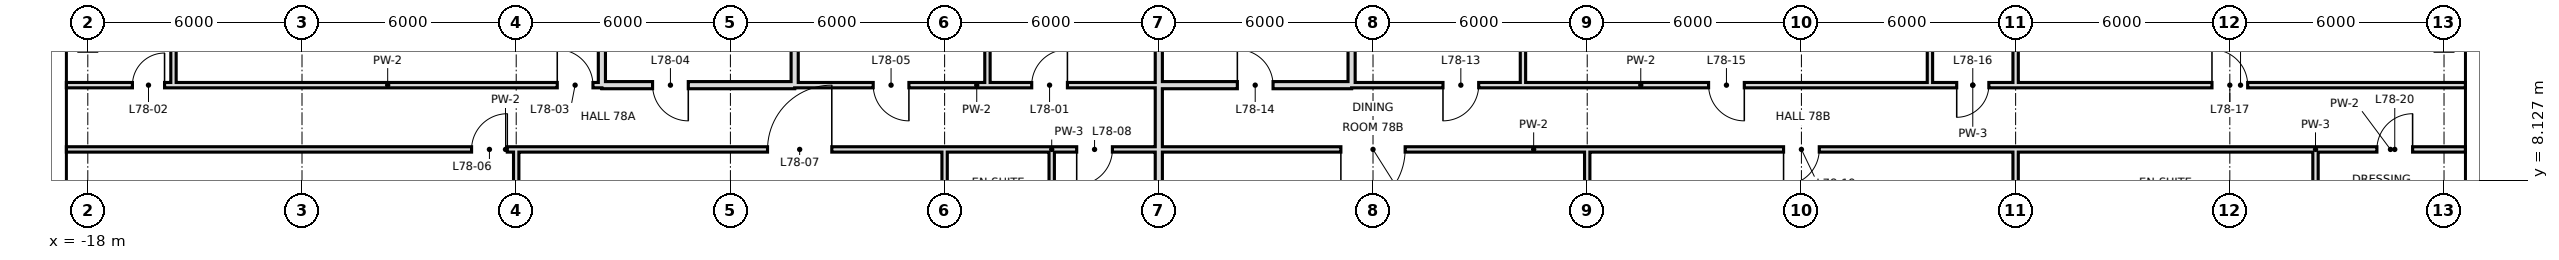
"""IFC4 building model, lengths in metres.
Left out: names, types, materials, properties, quantities, classifications, styles, units other than length and angle.
Written with IfcOpenShell. Run it as: python <this file> out.ifc"""

import sys

from ifc_helpers import new_model, si_unit, direction, frame, frame_2d, origin, place, context, subcontext, project, spatial, rectangle, extrude, element, fill, save


model = new_model("IFC4")
c1 = context("Model", 3, precision=1e-05, world=origin(), true_north=direction((0.0, 1.0)))
c2 = subcontext(c1, "Body", "Model", "MODEL_VIEW")
j1 = project(units=[si_unit("LENGTHUNIT", "METRE"), si_unit("PLANEANGLEUNIT", "RADIAN")], contexts=[c1])
p1 = place(None, origin())
s1 = spatial("IfcSite", under=j1, at=p1, CompositionType="ELEMENT")
p2 = place(p1, origin())
s2 = spatial("IfcBuilding", under=s1, at=p2, CompositionType="ELEMENT")
p3 = place(p2, frame((0.0, 0.0, 326.8)))
s3 = spatial("IfcBuildingStorey", under=s2, at=p3, CompositionType="ELEMENT", Elevation=326.8)
p4 = place(p3, frame((-15.6, 10.8, 0.0), z_axis=(0.0, 0.0, 1.0), x_axis=(0.0, 1.0, 0.0)))
e1 = element("IfcWall", 1, at=p4, inside=s3, PredefinedType="PARTITIONING", context=c2, shape_type="SweptSolid", body=[
    extrude(rectangle(XDim=7.2, YDim=0.15, at=frame_2d((3.6, 0.0))), origin(), (0.0, 0.0, 1.0), 4.1),
])
p5 = place(p3, frame((-3.6, 10.8, 0.0), z_axis=(0.0, 0.0, 1.0), x_axis=(0.0, 1.0, 0.0)))
e2 = element("IfcWall", 2, at=p5, inside=s3, PredefinedType="SOLIDWALL", context=c2, shape_type="SweptSolid", body=[
    extrude(rectangle(XDim=7.2, YDim=0.2, at=frame_2d((3.6, 0.0))), origin(), (0.0, 0.0, 1.0), 3.4),
])
p6 = place(p3, frame((-6.0, -0.6, 0.0), z_axis=(0.0, 0.0, 1.0), x_axis=(0.0, 1.0, 0.0)))
e3 = element("IfcWall", 3, at=p6, inside=s3, PredefinedType="PARTITIONING", context=c2, shape_type="SweptSolid", body=[
    extrude(rectangle(XDim=9.6, YDim=0.15, at=frame_2d((4.8, 0.0))), origin(), (0.0, 0.0, 1.0), 4.1),
])
p7 = place(p3, frame((1.8, 10.8, 0.0), z_axis=(0.0, 0.0, 1.0), x_axis=(0.0, 1.0, 0.0)))
e4 = element("IfcWall", 4, at=p7, inside=s3, PredefinedType="SOLIDWALL", context=c2, shape_type="SweptSolid", body=[
    extrude(rectangle(XDim=7.2, YDim=0.2, at=frame_2d((3.6, 0.0))), origin(), (0.0, 0.0, 1.0), 4.1),
])
p8 = place(p3, frame((12.0, 10.8, 0.0), z_axis=(0.0, 0.0, 1.0), x_axis=(0.0, 1.0, 0.0)))
e5 = element("IfcWall", 5, at=p8, inside=s3, PredefinedType="SOLIDWALL", context=c2, shape_type="SweptSolid", body=[
    extrude(rectangle(XDim=7.9, YDim=0.2, at=frame_2d((3.95, 0.0))), origin(), (0.0, 0.0, 1.0), 3.4),
])
p9 = place(p3, frame((12.0, 0.0, 0.0), z_axis=(0.0, 0.0, 1.0), x_axis=(0.0, 1.0, 0.0)))
e6 = element("IfcWall", 6, at=p9, inside=s3, PredefinedType="SOLIDWALL", context=c2, shape_type="SweptSolid", body=[
    extrude(rectangle(XDim=10.8, YDim=0.2, at=frame_2d((5.4, 0.0))), origin(), (0.0, 0.0, 1.0), 3.4),
])
p10 = place(p3, frame((17.4, 10.8, 0.0), z_axis=(0.0, 0.0, 1.0), x_axis=(0.0, 1.0, 0.0)))
e7 = element("IfcWall", 7, at=p10, inside=s3, PredefinedType="SOLIDWALL", context=c2, shape_type="SweptSolid", body=[
    extrude(rectangle(XDim=7.9, YDim=0.2, at=frame_2d((3.95, 0.0))), origin(), (0.0, 0.0, 1.0), 3.4),
])
p11 = place(p3, frame((22.2, 10.8, 0.0), z_axis=(0.0, 0.0, 1.0), x_axis=(0.0, 1.0, 0.0)))
e8 = element("IfcWall", 8, at=p11, inside=s3, PredefinedType="PARTITIONING", context=c2, shape_type="SweptSolid", body=[
    extrude(rectangle(XDim=7.9, YDim=0.15, at=frame_2d((3.95, 0.0))), origin(), (0.0, 0.0, 1.0), 4.1),
])
p12 = place(p3, frame((24.0, 0.0, 0.0), z_axis=(0.0, 0.0, 1.0), x_axis=(0.0, 1.0, 0.0)))
e9 = element("IfcWall", 9, at=p12, inside=s3, PredefinedType="PARTITIONING", context=c2, shape_type="SweptSolid", body=[
    extrude(rectangle(XDim=9.0, YDim=0.15, at=frame_2d((4.5, 0.0))), origin(), (0.0, 0.0, 1.0), 3.4),
])
p13 = place(p3, frame((33.6, 10.8, 0.0), z_axis=(0.0, 0.0, 1.0), x_axis=(0.0, 1.0, 0.0)))
e10 = element("IfcWall", 10, at=p13, inside=s3, PredefinedType="PARTITIONING", context=c2, shape_type="SweptSolid", body=[
    extrude(rectangle(XDim=7.9, YDim=0.15, at=frame_2d((3.95, 0.0))), origin(), (0.0, 0.0, 1.0), 4.1),
])
p14 = place(p3, frame((36.0, 6.0, 0.0), z_axis=(0.0, 0.0, 1.0), x_axis=(0.0, 1.0, 0.0)))
e11 = element("IfcWall", 11, at=p14, inside=s3, PredefinedType="PARTITIONING", context=c2, shape_type="SweptSolid", body=[
    extrude(rectangle(XDim=3.0, YDim=0.15, at=frame_2d((1.5, 0.0))), origin(), (0.0, 0.0, 1.0), 3.4),
])
p15 = place(p3, frame((36.0, 10.8, 0.0), z_axis=(0.0, 0.0, 1.0), x_axis=(0.0, 1.0, 0.0)))
e12 = element("IfcWall", 12, at=p15, inside=s3, PredefinedType="PARTITIONING", context=c2, shape_type="SweptSolid", body=[
    extrude(rectangle(XDim=7.9, YDim=0.15, at=frame_2d((3.95, 0.0))), origin(), (0.0, 0.0, 1.0), 3.4),
])
p16 = place(p3, frame((44.4, 6.0, 0.0), z_axis=(0.0, 0.0, 1.0), x_axis=(0.0, 1.0, 0.0)))
e13 = element("IfcWall", 13, at=p16, inside=s3, PredefinedType="PARTITIONING", context=c2, shape_type="SweptSolid", body=[
    extrude(rectangle(XDim=3.0, YDim=0.15, at=frame_2d((1.5, 0.0))), origin(), (0.0, 0.0, 1.0), 4.1),
])
p17 = place(p3, frame((6.0, 6.0, 0.0), z_axis=(0.0, 0.0, 1.0), x_axis=(0.0, 1.0, 0.0)))
e14 = element("IfcWall", 14, at=p17, inside=s3, PredefinedType="PARTITIONING", context=c2, shape_type="SweptSolid", body=[
    extrude(rectangle(XDim=3.0, YDim=0.15, at=frame_2d((1.5, 0.0))), origin(), (0.0, 0.0, 1.0), 3.4),
])
p18 = place(p3, frame((7.2, 10.8, 0.0), z_axis=(0.0, 0.0, 1.0), x_axis=(0.0, 1.0, 0.0)))
e15 = element("IfcWall", 15, at=p18, inside=s3, PredefinedType="PARTITIONING", context=c2, shape_type="SweptSolid", body=[
    extrude(rectangle(XDim=7.9, YDim=0.15, at=frame_2d((3.95, 0.0))), origin(), (0.0, 0.0, 1.0), 4.1),
])
p19 = place(p3, frame((9.0, 6.0, 0.0), z_axis=(0.0, 0.0, 1.0), x_axis=(0.0, 1.0, 0.0)))
e16 = element("IfcWall", 16, at=p19, inside=s3, PredefinedType="PARTITIONING", context=c2, shape_type="SweptSolid", body=[
    extrude(rectangle(XDim=3.0, YDim=0.15, at=frame_2d((1.5, 0.0))), origin(), (0.0, 0.0, 1.0), 4.1),
])
p20 = place(p3, frame((-3.6, 10.8, 0.0), z_axis=(0.0, 0.0, 1.0), x_axis=(1.0, 0.0, 0.0)))
e17 = element("IfcWall", 17, at=p20, inside=s3, PredefinedType="SOLIDWALL", context=c2, shape_type="SweptSolid", body=[
    extrude(rectangle(XDim=5.4, YDim=0.2, at=frame_2d((2.7, 0.0))), origin(), (0.0, 0.0, 1.0), 3.4),
])
p21 = place(p20, frame((1.42, 0.0, 0.0)))
e18 = element("IfcOpeningElement", 18, at=p21, cuts=e17, PredefinedType="OPENING", context=c2, shape_type="SweptSolid", body=[
    extrude(rectangle(XDim=1.0, YDim=2.4, at=frame_2d((0.5, 1.2))), frame((0.0, 0.11, 0.0), z_axis=(0.0, -1.0, 0.0), x_axis=(1.0, 0.0, 0.0)), (0.0, 0.0, 1.0), 0.22),
])
p22 = place(p3, frame((12.0, 10.8, 0.0), z_axis=(0.0, 0.0, 1.0), x_axis=(1.0, 0.0, 0.0)))
e19 = element("IfcWall", 19, at=p22, inside=s3, PredefinedType="SOLIDWALL", context=c2, shape_type="SweptSolid", body=[
    extrude(rectangle(XDim=5.4, YDim=0.2, at=frame_2d((2.7, 0.0))), origin(), (0.0, 0.0, 1.0), 3.4),
])
p23 = place(p22, frame((2.2, 0.0, 0.0)))
e20 = element("IfcOpeningElement", 20, at=p23, cuts=e19, PredefinedType="OPENING", context=c2, shape_type="SweptSolid", body=[
    extrude(rectangle(XDim=1.0, YDim=2.4, at=frame_2d((0.5, 1.2))), frame((0.0, 0.11, 0.0), z_axis=(0.0, -1.0, 0.0), x_axis=(1.0, 0.0, 0.0)), (0.0, 0.0, 1.0), 0.22),
])
p24 = place(p3, frame((-15.6, 10.8, 0.0), z_axis=(0.0, 0.0, 1.0), x_axis=(1.0, 0.0, 0.0)))
e21 = element("IfcWall", 21, at=p24, inside=s3, PredefinedType="PARTITIONING", context=c2, shape_type="SweptSolid", body=[
    extrude(rectangle(XDim=12.0, YDim=0.15, at=frame_2d((6.0, 0.0))), origin(), (0.0, 0.0, 1.0), 4.1),
])
p25 = place(p24, frame((10.75, 0.0, 0.0)))
e22 = element("IfcOpeningElement", 22, at=p25, cuts=e21, PredefinedType="OPENING", context=c2, shape_type="SweptSolid", body=[
    extrude(rectangle(XDim=1.0, YDim=2.4, at=frame_2d((0.5, 1.2))), frame((0.0, 0.085, 0.0), z_axis=(0.0, -1.0, 0.0), x_axis=(1.0, 0.0, 0.0)), (0.0, 0.0, 1.0), 0.17),
])
p26 = place(p3, frame((1.8, 10.8, 0.0), z_axis=(0.0, 0.0, 1.0), x_axis=(1.0, 0.0, 0.0)))
e23 = element("IfcWall", 23, at=p26, inside=s3, PredefinedType="PARTITIONING", context=c2, shape_type="SweptSolid", body=[
    extrude(rectangle(XDim=10.2, YDim=0.15, at=frame_2d((5.1, 0.0))), origin(), (0.0, 0.0, 1.0), 4.1),
])
p27 = place(p26, frame((6.64, 0.0, 0.0)))
e24 = element("IfcOpeningElement", 24, at=p27, cuts=e23, PredefinedType="OPENING", context=c2, shape_type="SweptSolid", body=[
    extrude(rectangle(XDim=1.0, YDim=2.4, at=frame_2d((0.5, 1.2))), frame((0.0, 0.085, 0.0), z_axis=(0.0, -1.0, 0.0), x_axis=(1.0, 0.0, 0.0)), (0.0, 0.0, 1.0), 0.17),
])
p28 = place(p26, frame((2.2, 0.0, 0.0)))
e25 = element("IfcOpeningElement", 25, at=p28, cuts=e23, PredefinedType="OPENING", context=c2, shape_type="SweptSolid", body=[
    extrude(rectangle(XDim=1.0, YDim=2.4, at=frame_2d((0.5, 1.2))), frame((0.0, 0.085, 0.0), z_axis=(0.0, -1.0, 0.0), x_axis=(1.0, 0.0, 0.0)), (0.0, 0.0, 1.0), 0.17),
])
p29 = place(p3, frame((17.4, 10.8, 0.0), z_axis=(0.0, 0.0, 1.0), x_axis=(1.0, 0.0, 0.0)))
e26 = element("IfcWall", 26, at=p29, inside=s3, PredefinedType="PARTITIONING", context=c2, shape_type="SweptSolid", body=[
    extrude(rectangle(XDim=16.2, YDim=0.15, at=frame_2d((8.1, 0.0))), origin(), (0.0, 0.0, 1.0), 4.1),
])
p30 = place(p29, frame((2.56, 0.0, 0.0)))
e27 = element("IfcOpeningElement", 27, at=p30, cuts=e26, PredefinedType="OPENING", context=c2, shape_type="SweptSolid", body=[
    extrude(rectangle(XDim=1.0, YDim=2.4, at=frame_2d((0.5, 1.2))), frame((0.0, 0.085, 0.0), z_axis=(0.0, -1.0, 0.0), x_axis=(1.0, 0.0, 0.0)), (0.0, 0.0, 1.0), 0.17),
])
p31 = place(p29, frame((10.0, 0.0, 0.0)))
e28 = element("IfcOpeningElement", 28, at=p31, cuts=e26, PredefinedType="OPENING", context=c2, shape_type="SweptSolid", body=[
    extrude(rectangle(XDim=1.0, YDim=2.4, at=frame_2d((0.5, 1.2))), frame((0.0, 0.085, 0.0), z_axis=(0.0, -1.0, 0.0), x_axis=(1.0, 0.0, 0.0)), (0.0, 0.0, 1.0), 0.17),
])
p32 = place(p3, frame((36.0, 10.8, 0.0), z_axis=(0.0, 0.0, 1.0), x_axis=(1.0, 0.0, 0.0)))
e29 = element("IfcWall", 29, at=p32, inside=s3, PredefinedType="PARTITIONING", context=c2, shape_type="SweptSolid", body=[
    extrude(rectangle(XDim=12.6, YDim=0.15, at=frame_2d((6.3, 0.0))), origin(), (0.0, 0.0, 1.0), 4.1),
])
p33 = place(p32, frame((5.5, 0.0, 0.0)))
e30 = element("IfcOpeningElement", 30, at=p33, cuts=e29, PredefinedType="OPENING", context=c2, shape_type="SweptSolid", body=[
    extrude(rectangle(XDim=1.0, YDim=2.4, at=frame_2d((0.5, 1.2))), frame((0.0, 0.085, 0.0), z_axis=(0.0, -1.0, 0.0), x_axis=(1.0, 0.0, 0.0)), (0.0, 0.0, 1.0), 0.17),
])
p34 = place(p3, frame((-18.6, 10.8, 0.0), z_axis=(0.0, 0.0, 1.0), x_axis=(1.0, 0.0, 0.0)))
e31 = element("IfcWall", 31, at=p34, inside=s3, PredefinedType="PARTITIONING", context=c2, shape_type="SweptSolid", body=[
    extrude(rectangle(XDim=3.0, YDim=0.15, at=frame_2d((1.5, 0.0))), origin(), (0.0, 0.0, 1.0), 4.1),
])
p35 = place(p34, frame((1.85, 0.0, 0.0)))
e32 = element("IfcOpeningElement", 32, at=p35, cuts=e31, PredefinedType="OPENING", context=c2, shape_type="SweptSolid", body=[
    extrude(rectangle(XDim=0.9, YDim=2.4, at=frame_2d((0.45, 1.2))), frame((0.0, 0.085, 0.0), z_axis=(0.0, -1.0, 0.0), x_axis=(1.0, 0.0, 0.0)), (0.0, 0.0, 1.0), 0.17),
])
p36 = place(p3, frame((33.6, 10.8, 0.0), z_axis=(0.0, 0.0, 1.0), x_axis=(1.0, 0.0, 0.0)))
e33 = element("IfcWall", 33, at=p36, inside=s3, PredefinedType="PARTITIONING", context=c2, shape_type="SweptSolid", body=[
    extrude(rectangle(XDim=2.4, YDim=0.15, at=frame_2d((1.2, 0.0))), origin(), (0.0, 0.0, 1.0), 4.1),
])
p37 = place(p36, frame((0.75, 0.0, 0.0)))
e34 = element("IfcOpeningElement", 34, at=p37, cuts=e33, PredefinedType="OPENING", context=c2, shape_type="SweptSolid", body=[
    extrude(rectangle(XDim=0.9, YDim=2.4, at=frame_2d((0.45, 1.2))), frame((0.0, 0.085, 0.0), z_axis=(0.0, -1.0, 0.0), x_axis=(1.0, 0.0, 0.0)), (0.0, 0.0, 1.0), 0.17),
])
p38 = place(p3, frame((-18.6, 9.0, 0.0), z_axis=(0.0, 0.0, 1.0), x_axis=(1.0, 0.0, 0.0)))
e35 = element("IfcWall", 35, at=p38, inside=s3, PredefinedType="PARTITIONING", context=c2, shape_type="SweptSolid", body=[
    extrude(rectangle(XDim=24.6, YDim=0.15, at=frame_2d((12.3, 0.0))), origin(), (0.0, 0.0, 1.0), 4.1),
])
p39 = place(p38, frame((11.35, 0.0, 0.0)))
e36 = element("IfcOpeningElement", 36, at=p39, cuts=e35, PredefinedType="OPENING", context=c2, shape_type="SweptSolid", body=[
    extrude(rectangle(XDim=1.0, YDim=2.4, at=frame_2d((0.5, 1.2))), frame((0.0, 0.085, 0.0), z_axis=(0.0, -1.0, 0.0), x_axis=(1.0, 0.0, 0.0)), (0.0, 0.0, 1.0), 0.17),
])
p40 = place(p38, frame((19.64, 0.0, 0.0)))
e37 = element("IfcOpeningElement", 37, at=p40, cuts=e35, PredefinedType="OPENING", context=c2, shape_type="SweptSolid", body=[
    extrude(rectangle(XDim=1.8, YDim=2.4, at=frame_2d((0.9, 1.2))), frame((0.0, 0.085, 0.0), z_axis=(0.0, -1.0, 0.0), x_axis=(1.0, 0.0, 0.0)), (0.0, 0.0, 1.0), 0.17),
])
p41 = place(p3, frame((9.0, 9.0, 0.0), z_axis=(0.0, 0.0, 1.0), x_axis=(1.0, 0.0, 0.0)))
e38 = element("IfcWall", 38, at=p41, inside=s3, PredefinedType="PARTITIONING", context=c2, shape_type="SweptSolid", body=[
    extrude(rectangle(XDim=27.0, YDim=0.15, at=frame_2d((13.5, 0.0))), origin(), (0.0, 0.0, 1.0), 4.1),
])
p42 = place(p41, frame((0.7, 0.0, 0.0)))
e39 = element("IfcOpeningElement", 39, at=p42, cuts=e38, PredefinedType="OPENING", context=c2, shape_type="SweptSolid", body=[
    extrude(rectangle(XDim=1.0, YDim=2.4, at=frame_2d((0.5, 1.2))), frame((0.0, 0.085, 0.0), z_axis=(0.0, -1.0, 0.0), x_axis=(1.0, 0.0, 0.0)), (0.0, 0.0, 1.0), 0.17),
])
p43 = place(p41, frame((8.1, 0.0, 0.0)))
e40 = element("IfcOpeningElement", 40, at=p43, cuts=e38, PredefinedType="OPENING", context=c2, shape_type="SweptSolid", body=[
    extrude(rectangle(XDim=1.8, YDim=2.4, at=frame_2d((0.9, 1.2))), frame((0.0, 0.085, 0.0), z_axis=(0.0, -1.0, 0.0), x_axis=(1.0, 0.0, 0.0)), (0.0, 0.0, 1.0), 0.17),
])
p44 = place(p41, frame((20.5, 0.0, 0.0)))
e41 = element("IfcOpeningElement", 41, at=p44, cuts=e38, PredefinedType="OPENING", context=c2, shape_type="SweptSolid", body=[
    extrude(rectangle(XDim=1.0, YDim=2.4, at=frame_2d((0.5, 1.2))), frame((0.0, 0.085, 0.0), z_axis=(0.0, -1.0, 0.0), x_axis=(1.0, 0.0, 0.0)), (0.0, 0.0, 1.0), 0.17),
])
p45 = place(p3, frame((44.4, 9.0, 0.0), z_axis=(0.0, 0.0, 1.0), x_axis=(1.0, 0.0, 0.0)))
e42 = element("IfcWall", 42, at=p45, inside=s3, PredefinedType="PARTITIONING", context=c2, shape_type="SweptSolid", body=[
    extrude(rectangle(XDim=4.2, YDim=0.15, at=frame_2d((2.1, 0.0))), origin(), (0.0, 0.0, 1.0), 4.1),
])
p46 = place(p45, frame((1.72, 0.0, 0.0)))
e43 = element("IfcOpeningElement", 43, at=p46, cuts=e42, PredefinedType="OPENING", context=c2, shape_type="SweptSolid", body=[
    extrude(rectangle(XDim=1.0, YDim=2.4, at=frame_2d((0.5, 1.2))), frame((0.0, 0.085, 0.0), z_axis=(0.0, -1.0, 0.0), x_axis=(1.0, 0.0, 0.0)), (0.0, 0.0, 1.0), 0.17),
])
p47 = place(p3, frame((6.0, 9.0, 0.0), z_axis=(0.0, 0.0, 1.0), x_axis=(1.0, 0.0, 0.0)))
e44 = element("IfcWall", 44, at=p47, inside=s3, PredefinedType="PARTITIONING", context=c2, shape_type="SweptSolid", body=[
    extrude(rectangle(XDim=3.0, YDim=0.15, at=frame_2d((1.5, 0.0))), origin(), (0.0, 0.0, 1.0), 4.1),
])
p48 = place(p3, frame((36.0, 9.0, 0.0), z_axis=(0.0, 0.0, 1.0), x_axis=(1.0, 0.0, 0.0)))
e45 = element("IfcWall", 45, at=p48, inside=s3, PredefinedType="PARTITIONING", context=c2, shape_type="SweptSolid", body=[
    extrude(rectangle(XDim=8.4, YDim=0.15, at=frame_2d((4.2, 0.0))), origin(), (0.0, 0.0, 1.0), 4.1),
])
p49 = place(p27, frame((1.0, 0.0, 0.0), z_axis=(0.0, 0.0, 1.0), x_axis=(-1.0, 0.0, 0.0)))
e46 = element("IfcDoor", 46, at=p49, inside=s3, OperationType="SINGLE_SWING_LEFT", PredefinedType="DOOR", context=c2, shape_type="SweptSolid", body=[
    extrude(rectangle(XDim=1.0, YDim=2.4, at=frame_2d((0.5, 1.2))), frame((0.0, 0.025, 0.0), z_axis=(0.0, -1.0, 0.0), x_axis=(1.0, 0.0, 0.0)), (0.0, 0.0, 1.0), 0.05),
])
fill(e24, e46)
p50 = place(p35, frame((0.9, 0.0, 0.0), z_axis=(0.0, 0.0, 1.0), x_axis=(-1.0, 0.0, 0.0)))
e47 = element("IfcDoor", 47, at=p50, inside=s3, OperationType="SINGLE_SWING_LEFT", PredefinedType="DOOR", context=c2, shape_type="SweptSolid", body=[
    extrude(rectangle(XDim=0.9, YDim=2.4, at=frame_2d((0.45, 1.2))), frame((0.0, 0.025, 0.0), z_axis=(0.0, -1.0, 0.0), x_axis=(1.0, 0.0, 0.0)), (0.0, 0.0, 1.0), 0.05),
])
fill(e32, e47)
p51 = place(p25, origin())
e48 = element("IfcDoor", 48, at=p51, inside=s3, OperationType="SINGLE_SWING_LEFT", PredefinedType="DOOR", context=c2, shape_type="SweptSolid", body=[
    extrude(rectangle(XDim=1.0, YDim=2.4, at=frame_2d((0.5, 1.2))), frame((0.0, 0.025, 0.0), z_axis=(0.0, -1.0, 0.0), x_axis=(1.0, 0.0, 0.0)), (0.0, 0.0, 1.0), 0.05),
])
fill(e22, e48)
p52 = place(p21, origin())
e49 = element("IfcDoor", 49, at=p52, inside=s3, OperationType="SINGLE_SWING_RIGHT", PredefinedType="DOOR", context=c2, shape_type="SweptSolid", body=[
    extrude(rectangle(XDim=1.0, YDim=2.4, at=frame_2d((0.5, 1.2))), frame((0.0, 0.025, 0.0), z_axis=(0.0, -1.0, 0.0), x_axis=(1.0, 0.0, 0.0)), (0.0, 0.0, 1.0), 0.05),
])
fill(e18, e49)
p53 = place(p28, origin())
e50 = element("IfcDoor", 50, at=p53, inside=s3, OperationType="SINGLE_SWING_RIGHT", PredefinedType="DOOR", context=c2, shape_type="SweptSolid", body=[
    extrude(rectangle(XDim=1.0, YDim=2.4, at=frame_2d((0.5, 1.2))), frame((0.0, 0.025, 0.0), z_axis=(0.0, -1.0, 0.0), x_axis=(1.0, 0.0, 0.0)), (0.0, 0.0, 1.0), 0.05),
])
fill(e25, e50)
p54 = place(p39, frame((1.0, 0.0, 0.0), z_axis=(0.0, 0.0, 1.0), x_axis=(-1.0, 0.0, 0.0)))
e51 = element("IfcDoor", 51, at=p54, inside=s3, OperationType="SINGLE_SWING_LEFT", PredefinedType="DOOR", context=c2, shape_type="SweptSolid", body=[
    extrude(rectangle(XDim=1.0, YDim=2.4, at=frame_2d((0.5, 1.2))), frame((0.0, 0.025, 0.0), z_axis=(0.0, -1.0, 0.0), x_axis=(1.0, 0.0, 0.0)), (0.0, 0.0, 1.0), 0.05),
])
fill(e36, e51)
p55 = place(p40, frame((1.8, 0.0, 0.0), z_axis=(0.0, 0.0, 1.0), x_axis=(-1.0, 0.0, 0.0)))
e52 = element("IfcDoor", 52, at=p55, inside=s3, OperationType="SINGLE_SWING_LEFT", PredefinedType="DOOR", context=c2, shape_type="SweptSolid", body=[
    extrude(rectangle(XDim=1.8, YDim=2.4, at=frame_2d((0.9, 1.2))), frame((0.0, 0.025, 0.0), z_axis=(0.0, -1.0, 0.0), x_axis=(1.0, 0.0, 0.0)), (0.0, 0.0, 1.0), 0.05),
])
fill(e37, e52)
p56 = place(p42, frame((1.0, 0.0, 0.0), z_axis=(0.0, 0.0, 1.0), x_axis=(-1.0, 0.0, 0.0)))
e53 = element("IfcDoor", 53, at=p56, inside=s3, OperationType="SINGLE_SWING_RIGHT", PredefinedType="DOOR", context=c2, shape_type="SweptSolid", body=[
    extrude(rectangle(XDim=1.0, YDim=2.4, at=frame_2d((0.5, 1.2))), frame((0.0, 0.025, 0.0), z_axis=(0.0, -1.0, 0.0), x_axis=(1.0, 0.0, 0.0)), (0.0, 0.0, 1.0), 0.05),
])
fill(e39, e53)
p57 = place(p30, frame((1.0, 0.0, 0.0), z_axis=(0.0, 0.0, 1.0), x_axis=(-1.0, 0.0, 0.0)))
e54 = element("IfcDoor", 54, at=p57, inside=s3, OperationType="SINGLE_SWING_RIGHT", PredefinedType="DOOR", context=c2, shape_type="SweptSolid", body=[
    extrude(rectangle(XDim=1.0, YDim=2.4, at=frame_2d((0.5, 1.2))), frame((0.0, 0.025, 0.0), z_axis=(0.0, -1.0, 0.0), x_axis=(1.0, 0.0, 0.0)), (0.0, 0.0, 1.0), 0.05),
])
fill(e27, e54)
p58 = place(p23, origin())
e55 = element("IfcDoor", 55, at=p58, inside=s3, OperationType="SINGLE_SWING_LEFT", PredefinedType="DOOR", context=c2, shape_type="SweptSolid", body=[
    extrude(rectangle(XDim=1.0, YDim=2.4, at=frame_2d((0.5, 1.2))), frame((0.0, 0.025, 0.0), z_axis=(0.0, -1.0, 0.0), x_axis=(1.0, 0.0, 0.0)), (0.0, 0.0, 1.0), 0.05),
])
fill(e20, e55)
p59 = place(p31, origin())
e56 = element("IfcDoor", 56, at=p59, inside=s3, OperationType="SINGLE_SWING_RIGHT", PredefinedType="DOOR", context=c2, shape_type="SweptSolid", body=[
    extrude(rectangle(XDim=1.0, YDim=2.4, at=frame_2d((0.5, 1.2))), frame((0.0, 0.025, 0.0), z_axis=(0.0, -1.0, 0.0), x_axis=(1.0, 0.0, 0.0)), (0.0, 0.0, 1.0), 0.05),
])
fill(e28, e56)
p60 = place(p37, frame((0.9, 0.0, 0.0), z_axis=(0.0, 0.0, 1.0), x_axis=(-1.0, 0.0, 0.0)))
e57 = element("IfcDoor", 57, at=p60, inside=s3, OperationType="SINGLE_SWING_RIGHT", PredefinedType="DOOR", context=c2, shape_type="SweptSolid", body=[
    extrude(rectangle(XDim=0.9, YDim=2.4, at=frame_2d((0.45, 1.2))), frame((0.0, 0.025, 0.0), z_axis=(0.0, -1.0, 0.0), x_axis=(1.0, 0.0, 0.0)), (0.0, 0.0, 1.0), 0.05),
])
fill(e34, e57)
p61 = place(p33, origin())
e58 = element("IfcDoor", 58, at=p61, inside=s3, OperationType="SINGLE_SWING_LEFT", PredefinedType="DOOR", context=c2, shape_type="SweptSolid", body=[
    extrude(rectangle(XDim=1.0, YDim=2.4, at=frame_2d((0.5, 1.2))), frame((0.0, 0.025, 0.0), z_axis=(0.0, -1.0, 0.0), x_axis=(1.0, 0.0, 0.0)), (0.0, 0.0, 1.0), 0.05),
])
fill(e30, e58)
p62 = place(p43, frame((1.8, 0.0, 0.0), z_axis=(0.0, 0.0, 1.0), x_axis=(-1.0, 0.0, 0.0)))
e59 = element("IfcDoor", 59, at=p62, inside=s3, OperationType="SINGLE_SWING_RIGHT", PredefinedType="DOOR", context=c2, shape_type="SweptSolid", body=[
    extrude(rectangle(XDim=1.8, YDim=2.4, at=frame_2d((0.9, 1.2))), frame((0.0, 0.025, 0.0), z_axis=(0.0, -1.0, 0.0), x_axis=(1.0, 0.0, 0.0)), (0.0, 0.0, 1.0), 0.05),
])
fill(e40, e59)
p63 = place(p44, frame((1.0, 0.0, 0.0), z_axis=(0.0, 0.0, 1.0), x_axis=(-1.0, 0.0, 0.0)))
e60 = element("IfcDoor", 60, at=p63, inside=s3, OperationType="SINGLE_SWING_RIGHT", PredefinedType="DOOR", context=c2, shape_type="SweptSolid", body=[
    extrude(rectangle(XDim=1.0, YDim=2.4, at=frame_2d((0.5, 1.2))), frame((0.0, 0.025, 0.0), z_axis=(0.0, -1.0, 0.0), x_axis=(1.0, 0.0, 0.0)), (0.0, 0.0, 1.0), 0.05),
])
fill(e41, e60)
p64 = place(p46, frame((1.0, 0.0, 0.0), z_axis=(0.0, 0.0, 1.0), x_axis=(-1.0, 0.0, 0.0)))
e61 = element("IfcDoor", 61, at=p64, inside=s3, OperationType="SINGLE_SWING_LEFT", PredefinedType="DOOR", context=c2, shape_type="SweptSolid", body=[
    extrude(rectangle(XDim=1.0, YDim=2.4, at=frame_2d((0.5, 1.2))), frame((0.0, 0.025, 0.0), z_axis=(0.0, -1.0, 0.0), x_axis=(1.0, 0.0, 0.0)), (0.0, 0.0, 1.0), 0.05),
])
fill(e43, e61)
save(model, sys.argv[1])
